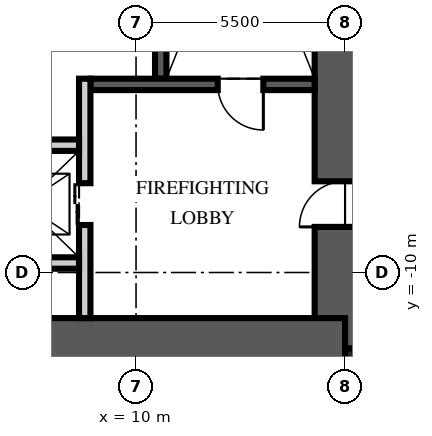
"""IFC4 building model, lengths in metres.
Left out: names, types, materials, properties, quantities, classifications, styles, units other than length and angle.
Written with IfcOpenShell. Run it as: python <this file> out.ifc"""

import sys

from ifc_helpers import new_model, si_unit, direction, frame, frame_2d, origin, origin_2d, place, context, subcontext, project, spatial, rectangle, extrude, element, fill, save


model = new_model("IFC4")
c1 = context("Model", 3, precision=1e-05, world=origin(), true_north=direction((0.0, 1.0)))
c2 = subcontext(c1, "Body", "Model", "MODEL_VIEW")
j1 = project(units=[si_unit("LENGTHUNIT", "METRE"), si_unit("PLANEANGLEUNIT", "RADIAN")], contexts=[c1])
p1 = place(None, origin())
s1 = spatial("IfcSite", under=j1, at=p1, CompositionType="ELEMENT")
p2 = place(p1, origin())
s2 = spatial("IfcBuilding", under=s1, at=p2, CompositionType="ELEMENT")
p3 = place(p2, frame((0.0, 0.0, 214.5)))
s3 = spatial("IfcBuildingStorey", under=s2, at=p3, CompositionType="ELEMENT", Elevation=214.5)
p4 = place(p3, frame((15.5, -12.0, -0.25), z_axis=(0.0, 0.0, 1.0), x_axis=(0.0, 1.0, 0.0)))
e1 = element("IfcWall", 1, at=p4, inside=s3, PredefinedType="SHEAR", context=c2, shape_type="SweptSolid", body=[
    extrude(rectangle(XDim=24.0, YDim=1.6, at=frame_2d((12.0, 0.0))), origin(), (0.0, 0.0, 1.0), 3.75),
])
p5 = place(p4, frame((3.2, 0.0, 0.25)))
e2 = element("IfcOpeningElement", 2, at=p5, cuts=e1, PredefinedType="OPENING", context=c2, shape_type="SweptSolid", body=[
    extrude(rectangle(XDim=1.2, YDim=2.1, at=frame_2d((0.6, 1.05))), frame((0.0, 0.81, 0.0), z_axis=(0.0, -1.0, 0.0), x_axis=(1.0, 0.0, 0.0)), (0.0, 0.0, 1.0), 1.62),
])
p6 = place(p4, frame((19.3, 0.0, 0.25)))
e3 = element("IfcOpeningElement", 3, at=p6, cuts=e1, PredefinedType="OPENING", context=c2, shape_type="SweptSolid", body=[
    extrude(rectangle(XDim=1.8, YDim=2.1, at=frame_2d((0.9, 1.05))), frame((0.0, 0.81, 0.0), z_axis=(0.0, -1.0, 0.0), x_axis=(1.0, 0.0, 0.0)), (0.0, 0.0, 1.0), 1.62),
])
p7 = place(p3, frame((-15.5, -12.0, -0.25), z_axis=(0.0, 0.0, 1.0), x_axis=(1.0, 0.0, 0.0)))
e4 = element("IfcWall", 4, at=p7, inside=s3, PredefinedType="SHEAR", context=c2, shape_type="SweptSolid", body=[
    extrude(rectangle(XDim=31.0, YDim=1.6, at=frame_2d((15.5, 0.0))), origin(), (0.0, 0.0, 1.0), 3.75),
])
p8 = place(p3, frame((15.9, -12.4, -0.25), z_axis=(0.0, 0.0, 1.0), x_axis=(1.0, 0.0, 0.0)))
e5 = element("IfcColumn", 5, at=p8, inside=s3, PredefinedType="COLUMN", context=c2, shape_type="SweptSolid", body=[
    extrude(rectangle(XDim=0.8, YDim=0.8, at=origin_2d()), origin(), (0.0, 0.0, 1.0), 3.75),
])
p9 = place(p3, frame((10.65, -4.9, 0.0), z_axis=(0.0, 0.0, 1.0), x_axis=(0.0, 1.0, 0.0)))
e6 = element("IfcWall", 6, at=p9, inside=s3, PredefinedType="SOLIDWALL", context=c2, shape_type="SweptSolid", body=[
    extrude(rectangle(XDim=10.1, YDim=0.3, at=frame_2d((5.05, 0.0))), origin(), (0.0, 0.0, 1.0), 3.5),
])
p10 = place(p3, frame((14.7, -5.05, 0.0), z_axis=(0.0, 0.0, 1.0), x_axis=(-1.0, 0.0, 0.0)))
e7 = element("IfcWall", 7, at=p10, inside=s3, PredefinedType="SOLIDWALL", context=c2, shape_type="SweptSolid", body=[
    extrude(rectangle(XDim=5.9, YDim=0.3, at=frame_2d((2.95, 0.0))), origin(), (0.0, 0.0, 1.0), 3.5),
])
p11 = place(p10, frame((1.35, 0.0, 0.0)))
e8 = element("IfcOpeningElement", 8, at=p11, cuts=e7, PredefinedType="OPENING", context=c2, shape_type="SweptSolid", body=[
    extrude(rectangle(XDim=1.2, YDim=2.1, at=frame_2d((0.6, 1.05))), frame((0.0, 0.16, 0.0), z_axis=(0.0, -1.0, 0.0), x_axis=(1.0, 0.0, 0.0)), (0.0, 0.0, 1.0), 0.32),
])
p12 = place(p3, frame((8.65, -11.2, 0.0), z_axis=(0.0, 0.0, 1.0), x_axis=(0.0, 1.0, 0.0)))
e9 = element("IfcWall", 9, at=p12, inside=s3, PredefinedType="PARTITIONING", context=c2, shape_type="SweptSolid", body=[
    extrude(rectangle(XDim=6.3, YDim=0.3, at=frame_2d((3.15, 0.0))), origin(), (0.0, 0.0, 1.0), 3.5),
])
p13 = place(p12, frame((2.45, 0.0, 0.0)))
e10 = element("IfcOpeningElement", 10, at=p13, cuts=e9, PredefinedType="OPENING", context=c2, shape_type="SweptSolid", body=[
    extrude(rectangle(XDim=1.1, YDim=2.1, at=frame_2d((0.55, 1.05))), frame((0.0, 0.16, 0.0), z_axis=(0.0, -1.0, 0.0), x_axis=(1.0, 0.0, 0.0)), (0.0, 0.0, 1.0), 0.32),
])
p14 = place(p3, frame((-8.5, -6.65, 0.0), z_axis=(0.0, 0.0, 1.0), x_axis=(1.0, 0.0, 0.0)))
e11 = element("IfcWall", 11, at=p14, inside=s3, PredefinedType="PARTITIONING", context=c2, shape_type="SweptSolid", body=[
    extrude(rectangle(XDim=17.0, YDim=0.3, at=frame_2d((8.5, 0.0))), origin(), (0.0, 0.0, 1.0), 3.5),
])
p15 = place(p14, frame((7.8, 0.0, 0.0)))
e12 = element("IfcOpeningElement", 12, at=p15, cuts=e11, PredefinedType="OPENING", context=c2, shape_type="SweptSolid", body=[
    extrude(rectangle(XDim=1.3, YDim=2.4, at=frame_2d((0.65, 1.2))), frame((0.0, 0.16, 0.0), z_axis=(0.0, -1.0, 0.0), x_axis=(1.0, 0.0, 0.0)), (0.0, 0.0, 1.0), 0.32),
])
p16 = place(p14, frame((5.65, 0.0, 0.0)))
e13 = element("IfcOpeningElement", 13, at=p16, cuts=e11, PredefinedType="OPENING", context=c2, shape_type="SweptSolid", body=[
    extrude(rectangle(XDim=0.9, YDim=2.1, at=frame_2d((0.45, 1.05))), frame((0.0, 0.16, 0.0), z_axis=(0.0, -1.0, 0.0), x_axis=(1.0, 0.0, 0.0)), (0.0, 0.0, 1.0), 0.32),
])
p17 = place(p14, frame((10.4, 0.0, 0.0)))
e14 = element("IfcOpeningElement", 14, at=p17, cuts=e11, PredefinedType="OPENING", context=c2, shape_type="SweptSolid", body=[
    extrude(rectangle(XDim=0.9, YDim=2.1, at=frame_2d((0.45, 1.05))), frame((0.0, 0.16, 0.0), z_axis=(0.0, -1.0, 0.0), x_axis=(1.0, 0.0, 0.0)), (0.0, 0.0, 1.0), 0.32),
])
p18 = place(p3, frame((5.6, -9.75, 0.0), z_axis=(0.0, 0.0, 1.0), x_axis=(1.0, 0.0, 0.0)))
e15 = element("IfcWall", 15, at=p18, inside=s3, PredefinedType="PARTITIONING", context=c2, shape_type="SweptSolid", body=[
    extrude(rectangle(XDim=2.9, YDim=0.3, at=frame_2d((1.45, 0.0))), origin(), (0.0, 0.0, 1.0), 3.5),
])
p19 = place(p11, origin())
e16 = element("IfcDoor", 16, at=p19, inside=s3, OperationType="SINGLE_SWING_LEFT", PredefinedType="DOOR", context=c2, shape_type="SweptSolid", body=[
    extrude(rectangle(XDim=1.2, YDim=2.1, at=frame_2d((0.6, 1.05))), frame((0.0, 0.025, 0.0), z_axis=(0.0, -1.0, 0.0), x_axis=(1.0, 0.0, 0.0)), (0.0, 0.0, 1.0), 0.05),
])
fill(e8, e16)
p20 = place(p5, origin())
e17 = element("IfcDoor", 17, at=p20, inside=s3, OperationType="SINGLE_SWING_LEFT", PredefinedType="DOOR", context=c2, shape_type="SweptSolid", body=[
    extrude(rectangle(XDim=1.2, YDim=2.1, at=frame_2d((0.6, 1.05))), frame((0.0, 0.025, 0.0), z_axis=(0.0, -1.0, 0.0), x_axis=(1.0, 0.0, 0.0)), (0.0, 0.0, 1.0), 0.05),
])
fill(e2, e17)
p21 = place(p13, origin())
e18 = element("IfcDoor", 18, at=p21, inside=s3, OperationType="DOUBLE_DOOR_SLIDING", PredefinedType="DOOR", context=c2, shape_type="SweptSolid", body=[
    extrude(rectangle(XDim=1.1, YDim=2.1, at=frame_2d((0.55, 1.05))), frame((0.0, 0.025, 0.0), z_axis=(0.0, -1.0, 0.0), x_axis=(1.0, 0.0, 0.0)), (0.0, 0.0, 1.0), 0.05),
])
fill(e10, e18)
save(model, sys.argv[1])
